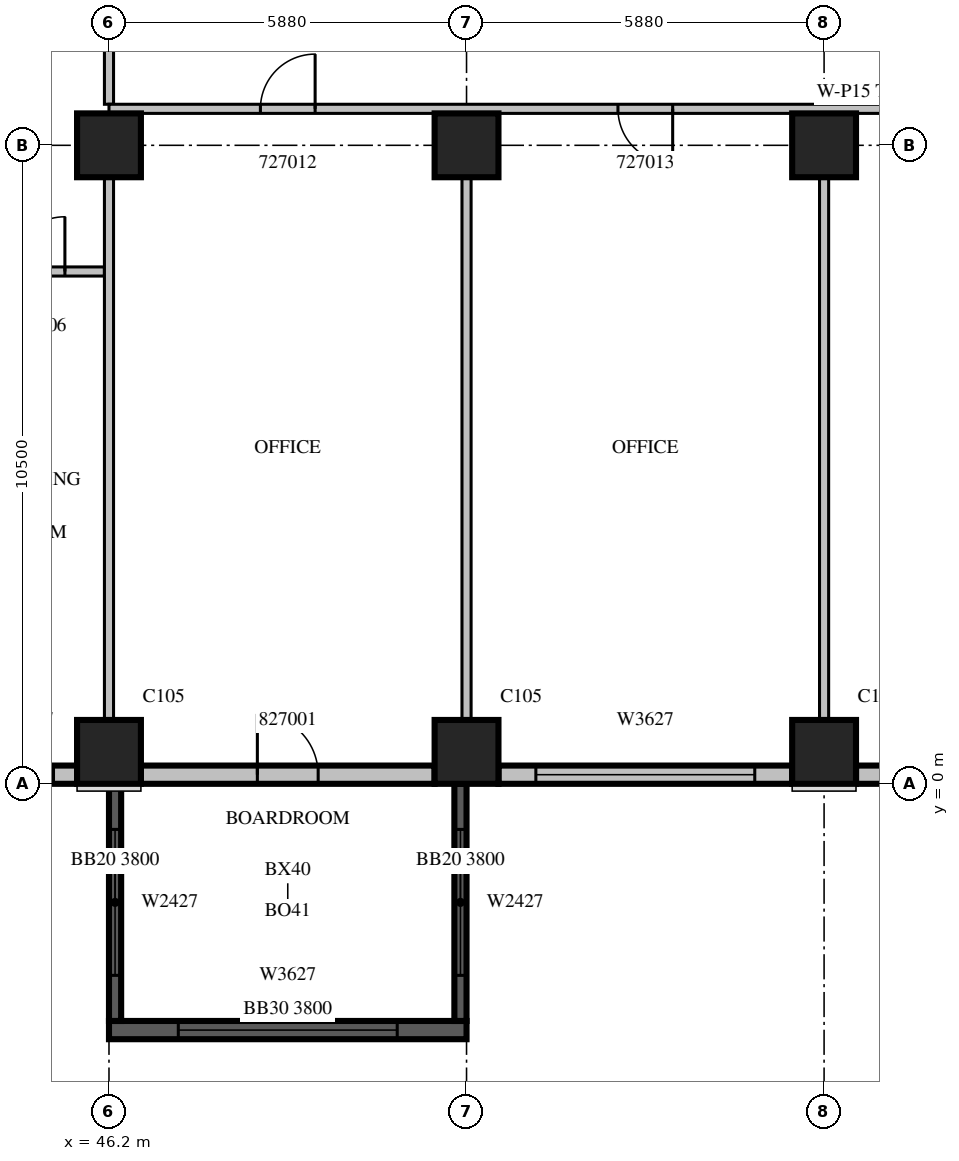
"""IFC4 building model, lengths in metres.
Left out: names, types, materials, properties, quantities, classifications, styles, units other than length and angle.
Written with IfcOpenShell. Run it as: python <this file> out.ifc"""

import sys

from ifc_helpers import new_model, si_unit, direction, frame, frame_2d, origin, origin_2d, place, context, subcontext, project, spatial, rectangle, extrude, source, transform, mapped, element, fill, save


model = new_model("IFC4")
c1 = context("Model", 3, precision=1e-05, world=origin(), true_north=direction((0.0, 1.0)))
c2 = subcontext(c1, "Body", "Model", "MODEL_VIEW")
j1 = project(units=[si_unit("LENGTHUNIT", "METRE"), si_unit("PLANEANGLEUNIT", "RADIAN")], contexts=[c1])
p1 = place(None, origin())
s1 = spatial("IfcSite", under=j1, at=p1, CompositionType="ELEMENT")
p2 = place(p1, origin())
s2 = spatial("IfcBuilding", under=s1, at=p2, CompositionType="ELEMENT")
p3 = place(p2, frame((0.0, 0.0, 124.5)))
s3 = spatial("IfcBuildingStorey", under=s2, at=p3, CompositionType="ELEMENT", Elevation=124.5)
m1 = source(origin(), c2, "Body", "SweptSolid", [
    extrude(rectangle(XDim=1.05, YDim=1.05, at=origin_2d()), origin(), (0.0, 0.0, 1.0), 4.2),
])
for number, where, z_axis, x_axis in (
    (1, (46.2, 0.525, 0.0), (0.0, 0.0, 1.0), (1.0, 0.0, 0.0)),
    (2, (52.08, 0.525, 0.0), (0.0, 0.0, 1.0), (1.0, 0.0, 0.0)),
    (3, (57.96, 0.525, 0.0), (0.0, 0.0, 1.0), (1.0, 0.0, 0.0)),
    (4, (46.2, 10.5, 0.0), (0.0, 0.0, 1.0), (1.0, 0.0, 0.0)),
    (5, (52.08, 10.5, 0.0), (0.0, 0.0, 1.0), (1.0, 0.0, 0.0)),
    (6, (57.96, 10.5, 0.0), (0.0, 0.0, 1.0), (1.0, 0.0, 0.0)),
):
    element("IfcColumn", number, at=place(p3, frame(where, z_axis=z_axis, x_axis=x_axis)), inside=s3, PredefinedType="COLUMN", context=c2, shape_type="MappedRepresentation", body=[
        mapped(m1, transform((0.0, 0.0, 0.0), scale=1.0)),
    ])
m2 = source(origin(), c2, "Body", "SweptSolid", [
    extrude(rectangle(XDim=5.88, YDim=0.3, at=frame_2d((2.94, 0.0))), origin(), (0.0, 0.0, 1.0), 3.8),
])
p4 = place(p3, frame((46.2, -4.05, 0.0), z_axis=(0.0, 0.0, 1.0), x_axis=(1.0, 0.0, 0.0)))
e7 = element("IfcWall", 7, at=p4, inside=s3, PredefinedType="SOLIDWALL", context=c2, shape_type="MappedRepresentation", body=[
    mapped(m2, transform((0.0, 0.0, 0.0), scale=1.0)),
])
m3 = source(origin(), c2, "Body", "SweptSolid", [
    extrude(rectangle(XDim=3.6, YDim=2.7, at=frame_2d((1.8, 1.35))), frame((0.0, 0.16, 0.0), z_axis=(0.0, -1.0, 0.0), x_axis=(1.0, 0.0, 0.0)), (0.0, 0.0, 1.0), 0.32),
])
p5 = place(p4, frame((1.14, 0.0, 0.6)))
e8 = element("IfcOpeningElement", 8, at=p5, cuts=e7, PredefinedType="OPENING", context=c2, shape_type="MappedRepresentation", body=[
    mapped(m3, transform((0.0, 0.0, 0.0), scale=1.0)),
])
m4 = source(origin(), c2, "Body", "SweptSolid", [
    extrude(rectangle(XDim=3.9, YDim=0.2, at=frame_2d((1.95, 0.0))), origin(), (0.0, 0.0, 1.0), 3.8),
])
p6 = place(p3, frame((46.3, 0.0, 0.0), z_axis=(0.0, 0.0, 1.0), x_axis=(0.0, -1.0, 0.0)))
e9 = element("IfcWall", 9, at=p6, inside=s3, PredefinedType="SOLIDWALL", context=c2, shape_type="MappedRepresentation", body=[
    mapped(m4, transform((0.0, 0.0, 0.0), scale=1.0)),
])
m5 = source(origin(), c2, "Body", "SweptSolid", [
    extrude(rectangle(XDim=2.4, YDim=2.7, at=frame_2d((1.2, 1.35))), frame((0.0, 0.11, 0.0), z_axis=(0.0, -1.0, 0.0), x_axis=(1.0, 0.0, 0.0)), (0.0, 0.0, 1.0), 0.22),
])
p7 = place(p6, frame((0.75, 0.0, 0.6)))
e10 = element("IfcOpeningElement", 10, at=p7, cuts=e9, PredefinedType="OPENING", context=c2, shape_type="MappedRepresentation", body=[
    mapped(m5, transform((0.0, 0.0, 0.0), scale=1.0)),
])
p8 = place(p3, frame((51.98, 0.0, 0.0), z_axis=(0.0, 0.0, 1.0), x_axis=(0.0, -1.0, 0.0)))
e11 = element("IfcWall", 11, at=p8, inside=s3, PredefinedType="SOLIDWALL", context=c2, shape_type="MappedRepresentation", body=[
    mapped(m4, transform((0.0, 0.0, 0.0), scale=1.0)),
])
p9 = place(p8, frame((0.75, 0.0, 0.6)))
e12 = element("IfcOpeningElement", 12, at=p9, cuts=e11, PredefinedType="OPENING", context=c2, shape_type="MappedRepresentation", body=[
    mapped(m5, transform((0.0, 0.0, 0.0), scale=1.0)),
])
m6 = source(origin(), c2, "Body", "SweptSolid", [
    extrude(rectangle(XDim=1.675, YDim=0.3, at=frame_2d((0.838, 0.0))), origin(), (0.0, 0.0, 1.0), 3.8),
])
p10 = place(p3, frame((44.0, 0.15, 0.0), z_axis=(0.0, 0.0, 1.0), x_axis=(1.0, 0.0, 0.0)))
e13 = element("IfcWall", 13, at=p10, inside=s3, PredefinedType="STANDARD", context=c2, shape_type="MappedRepresentation", body=[
    mapped(m6, transform((0.0, 0.0, 0.0), scale=1.0)),
])
m7 = source(origin(), c2, "Body", "SweptSolid", [
    extrude(rectangle(XDim=0.9, YDim=2.7, at=frame_2d((0.45, 1.35))), frame((0.0, 0.16, 0.0), z_axis=(0.0, -1.0, 0.0), x_axis=(1.0, 0.0, 0.0)), (0.0, 0.0, 1.0), 0.32),
])
p11 = place(p10, frame((0.388, 0.0, 0.6)))
e14 = element("IfcOpeningElement", 14, at=p11, cuts=e13, PredefinedType="OPENING", context=c2, shape_type="MappedRepresentation", body=[
    mapped(m7, transform((0.0, 0.0, 0.0), scale=1.0)),
])
m8 = source(origin(), c2, "Body", "SweptSolid", [
    extrude(rectangle(XDim=4.83, YDim=0.3, at=frame_2d((2.415, 0.0))), origin(), (0.0, 0.0, 1.0), 3.8),
])
p12 = place(p3, frame((46.725, 0.15, 0.0), z_axis=(0.0, 0.0, 1.0), x_axis=(1.0, 0.0, 0.0)))
e15 = element("IfcWall", 15, at=p12, inside=s3, PredefinedType="STANDARD", context=c2, shape_type="MappedRepresentation", body=[
    mapped(m8, transform((0.0, 0.0, 0.0), scale=1.0)),
])
m9 = source(origin(), c2, "Body", "SweptSolid", [
    extrude(rectangle(XDim=1.0, YDim=2.1, at=frame_2d((0.5, 1.05))), frame((0.0, 0.16, 0.0), z_axis=(0.0, -1.0, 0.0), x_axis=(1.0, 0.0, 0.0)), (0.0, 0.0, 1.0), 0.32),
])
p13 = place(p12, frame((1.915, 0.0, 0.0)))
e16 = element("IfcOpeningElement", 16, at=p13, cuts=e15, PredefinedType="OPENING", context=c2, shape_type="MappedRepresentation", body=[
    mapped(m9, transform((0.0, 0.0, 0.0), scale=1.0)),
])
p14 = place(p3, frame((52.605, 0.15, 0.0), z_axis=(0.0, 0.0, 1.0), x_axis=(1.0, 0.0, 0.0)))
e17 = element("IfcWall", 17, at=p14, inside=s3, PredefinedType="STANDARD", context=c2, shape_type="MappedRepresentation", body=[
    mapped(m8, transform((0.0, 0.0, 0.0), scale=1.0)),
])
p15 = place(p14, frame((0.615, 0.0, 0.6)))
e18 = element("IfcOpeningElement", 18, at=p15, cuts=e17, PredefinedType="OPENING", context=c2, shape_type="MappedRepresentation", body=[
    mapped(m3, transform((0.0, 0.0, 0.0), scale=1.0)),
])
p16 = place(p3, frame((58.485, 0.15, 0.0), z_axis=(0.0, 0.0, 1.0), x_axis=(1.0, 0.0, 0.0)))
e19 = element("IfcWall", 19, at=p16, inside=s3, PredefinedType="STANDARD", context=c2, shape_type="MappedRepresentation", body=[
    mapped(m8, transform((0.0, 0.0, 0.0), scale=1.0)),
])
m10 = source(origin(), c2, "Body", "SweptSolid", [
    extrude(rectangle(XDim=1.8, YDim=2.7, at=frame_2d((0.9, 1.35))), frame((0.0, 0.16, 0.0), z_axis=(0.0, -1.0, 0.0), x_axis=(1.0, 0.0, 0.0)), (0.0, 0.0, 1.0), 0.32),
])
p17 = place(p16, frame((0.953, 0.0, 0.6)))
e20 = element("IfcOpeningElement", 20, at=p17, cuts=e19, PredefinedType="OPENING", context=c2, shape_type="MappedRepresentation", body=[
    mapped(m10, transform((0.0, 0.0, 0.0), scale=1.0)),
])
m11 = source(origin(), c2, "Body", "SweptSolid", [
    extrude(rectangle(XDim=2.2, YDim=0.15, at=frame_2d((1.1, 0.0))), origin(), (0.0, 0.0, 1.0), 3.8),
])
p18 = place(p3, frame((46.125, 8.425, 0.0), z_axis=(0.0, 0.0, 1.0), x_axis=(-1.0, 0.0, 0.0)))
e21 = element("IfcWall", 21, at=p18, inside=s3, PredefinedType="PARTITIONING", context=c2, shape_type="MappedRepresentation", body=[
    mapped(m11, transform((0.0, 0.0, 0.0), scale=1.0)),
])
m12 = source(origin(), c2, "Body", "SweptSolid", [
    extrude(rectangle(XDim=0.9, YDim=2.1, at=frame_2d((0.45, 1.05))), frame((0.0, 0.085, 0.0), z_axis=(0.0, -1.0, 0.0), x_axis=(1.0, 0.0, 0.0)), (0.0, 0.0, 1.0), 0.17),
])
p19 = place(p18, frame((0.65, 0.0, 0.0)))
e22 = element("IfcOpeningElement", 22, at=p19, cuts=e21, PredefinedType="OPENING", context=c2, shape_type="MappedRepresentation", body=[
    mapped(m12, transform((0.0, 0.0, 0.0), scale=1.0)),
])
m13 = source(origin(), c2, "Body", "SweptSolid", [
    extrude(rectangle(XDim=8.927, YDim=0.15, at=frame_2d((4.463, 0.0))), origin(), (0.0, 0.0, 1.0), 3.8),
])
for number, where, z_axis, x_axis in (
    (23, (52.08, 1.049, 0.0), (0.0, 0.0, 1.0), (0.0, 1.0, 0.0)),
    (24, (57.96, 1.049, 0.0), (0.0, 0.0, 1.0), (0.0, 1.0, 0.0)),
    (25, (46.2, 1.049, 0.0), (0.0, 0.0, 1.0), (0.0, 1.0, 0.0)),
):
    element("IfcWall", number, at=place(p3, frame(where, z_axis=z_axis, x_axis=x_axis)), inside=s3, PredefinedType="PARTITIONING", context=c2, shape_type="MappedRepresentation", body=[
        mapped(m13, transform((0.0, 0.0, 0.0), scale=1.0)),
    ])
m14 = source(origin(), c2, "Body", "SweptSolid", [
    extrude(rectangle(XDim=3.825, YDim=0.15, at=frame_2d((1.913, 0.0))), origin(), (0.0, 0.0, 1.0), 3.8),
])
p20 = place(p3, frame((46.2, 11.175, 0.0), z_axis=(0.0, 0.0, 1.0), x_axis=(0.0, 1.0, 0.0)))
e26 = element("IfcWall", 26, at=p20, inside=s3, PredefinedType="PARTITIONING", context=c2, shape_type="MappedRepresentation", body=[
    mapped(m14, transform((0.0, 0.0, 0.0), scale=1.0)),
])
m15 = source(origin(), c2, "Body", "SweptSolid", [
    extrude(rectangle(XDim=24.9, YDim=0.15, at=frame_2d((12.45, 0.0))), origin(), (0.0, 0.0, 1.0), 3.8),
])
p21 = place(p3, frame((71.1, 11.1, 0.0), z_axis=(0.0, 0.0, 1.0), x_axis=(-1.0, 0.0, 0.0)))
e27 = element("IfcWall", 27, at=p21, inside=s3, PredefinedType="PARTITIONING", context=c2, shape_type="MappedRepresentation", body=[
    mapped(m15, transform((0.0, 0.0, 0.0), scale=1.0)),
])
p22 = place(p21, frame((21.51, 0.0, 0.0)))
e28 = element("IfcOpeningElement", 28, at=p22, cuts=e27, PredefinedType="OPENING", context=c2, shape_type="MappedRepresentation", body=[
    mapped(m12, transform((0.0, 0.0, 0.0), scale=1.0)),
])
p23 = place(p21, frame((15.63, 0.0, 0.0)))
e29 = element("IfcOpeningElement", 29, at=p23, cuts=e27, PredefinedType="OPENING", context=c2, shape_type="MappedRepresentation", body=[
    mapped(m12, transform((0.0, 0.0, 0.0), scale=1.0)),
])
p24 = place(p21, frame((9.75, 0.0, 0.0)))
e30 = element("IfcOpeningElement", 30, at=p24, cuts=e27, PredefinedType="OPENING", context=c2, shape_type="MappedRepresentation", body=[
    mapped(m12, transform((0.0, 0.0, 0.0), scale=1.0)),
])
p25 = place(p21, frame((4.645, 0.0, 0.0)))
e31 = element("IfcOpeningElement", 31, at=p25, cuts=e27, PredefinedType="OPENING", context=c2, shape_type="MappedRepresentation", body=[
    mapped(m12, transform((0.0, 0.0, 0.0), scale=1.0)),
])
m16 = source(origin(), c2, "Body", "SweptSolid", [
    extrude(rectangle(XDim=1.1, YDim=2.1, at=frame_2d((0.55, 1.05))), frame((0.0, 0.085, 0.0), z_axis=(0.0, -1.0, 0.0), x_axis=(1.0, 0.0, 0.0)), (0.0, 0.0, 1.0), 0.17),
])
p26 = place(p21, frame((2.105, 0.0, 0.0)))
e32 = element("IfcOpeningElement", 32, at=p26, cuts=e27, PredefinedType="OPENING", context=c2, shape_type="MappedRepresentation", body=[
    mapped(m16, transform((0.0, 0.0, 0.0), scale=1.0)),
])
m17 = source(origin(), c2, "Body", "SweptSolid", [
    extrude(rectangle(XDim=3.6, YDim=2.7, at=frame_2d((1.8, 1.35))), frame((0.0, 0.03, 0.0), z_axis=(0.0, -1.0, 0.0), x_axis=(1.0, 0.0, 0.0)), (0.0, 0.0, 1.0), 0.06),
])
p27 = place(p5, origin())
e33 = element("IfcWindow", 33, at=p27, inside=s3, PartitioningType="SINGLE_PANEL", PredefinedType="WINDOW", context=c2, shape_type="MappedRepresentation", body=[
    mapped(m17, transform((0.0, 0.0, 0.0), scale=1.0)),
])
fill(e8, e33)
m18 = source(origin(), c2, "Body", "SweptSolid", [
    extrude(rectangle(XDim=2.4, YDim=2.7, at=frame_2d((1.2, 1.35))), frame((0.0, 0.03, 0.0), z_axis=(0.0, -1.0, 0.0), x_axis=(1.0, 0.0, 0.0)), (0.0, 0.0, 1.0), 0.06),
])
p28 = place(p7, origin())
e34 = element("IfcWindow", 34, at=p28, inside=s3, PartitioningType="SINGLE_PANEL", PredefinedType="WINDOW", context=c2, shape_type="MappedRepresentation", body=[
    mapped(m18, transform((0.0, 0.0, 0.0), scale=1.0)),
])
fill(e10, e34)
p29 = place(p9, origin())
e35 = element("IfcWindow", 35, at=p29, inside=s3, PartitioningType="SINGLE_PANEL", PredefinedType="WINDOW", context=c2, shape_type="MappedRepresentation", body=[
    mapped(m18, transform((0.0, 0.0, 0.0), scale=1.0)),
])
fill(e12, e35)
m19 = source(origin(), c2, "Body", "SweptSolid", [
    extrude(rectangle(XDim=0.9, YDim=2.7, at=frame_2d((0.45, 1.35))), frame((0.0, 0.03, 0.0), z_axis=(0.0, -1.0, 0.0), x_axis=(1.0, 0.0, 0.0)), (0.0, 0.0, 1.0), 0.06),
])
p30 = place(p11, origin())
e36 = element("IfcWindow", 36, at=p30, inside=s3, PartitioningType="SINGLE_PANEL", PredefinedType="WINDOW", context=c2, shape_type="MappedRepresentation", body=[
    mapped(m19, transform((0.0, 0.0, 0.0), scale=1.0)),
])
fill(e14, e36)
p31 = place(p15, origin())
e37 = element("IfcWindow", 37, at=p31, inside=s3, PartitioningType="SINGLE_PANEL", PredefinedType="WINDOW", context=c2, shape_type="MappedRepresentation", body=[
    mapped(m17, transform((0.0, 0.0, 0.0), scale=1.0)),
])
fill(e18, e37)
m20 = source(origin(), c2, "Body", "SweptSolid", [
    extrude(rectangle(XDim=0.9, YDim=2.1, at=frame_2d((0.45, 1.05))), frame((0.0, 0.025, 0.0), z_axis=(0.0, -1.0, 0.0), x_axis=(1.0, 0.0, 0.0)), (0.0, 0.0, 1.0), 0.05),
])
p32 = place(p19, origin())
e38 = element("IfcDoor", 38, at=p32, inside=s3, OperationType="SINGLE_SWING_RIGHT", PredefinedType="DOOR", context=c2, shape_type="MappedRepresentation", body=[
    mapped(m20, transform((0.0, 0.0, 0.0), scale=1.0)),
])
fill(e22, e38)
p33 = place(p22, origin())
e39 = element("IfcDoor", 39, at=p33, inside=s3, OperationType="SINGLE_SWING_RIGHT", PredefinedType="DOOR", context=c2, shape_type="MappedRepresentation", body=[
    mapped(m20, transform((0.0, 0.0, 0.0), scale=1.0)),
])
fill(e28, e39)
p34 = place(p23, origin())
e40 = element("IfcDoor", 40, at=p34, inside=s3, OperationType="SINGLE_SWING_LEFT", PredefinedType="DOOR", context=c2, shape_type="MappedRepresentation", body=[
    mapped(m20, transform((0.0, 0.0, 0.0), scale=1.0)),
])
fill(e29, e40)
m21 = source(origin(), c2, "Body", "SweptSolid", [
    extrude(rectangle(XDim=1.0, YDim=2.1, at=frame_2d((0.5, 1.05))), frame((0.0, 0.025, 0.0), z_axis=(0.0, -1.0, 0.0), x_axis=(1.0, 0.0, 0.0)), (0.0, 0.0, 1.0), 0.05),
])
p35 = place(p13, origin())
e41 = element("IfcDoor", 41, at=p35, inside=s3, OperationType="SINGLE_SWING_LEFT", PredefinedType="DOOR", context=c2, shape_type="MappedRepresentation", body=[
    mapped(m21, transform((0.0, 0.0, 0.0), scale=1.0)),
])
fill(e16, e41)
save(model, sys.argv[1])
